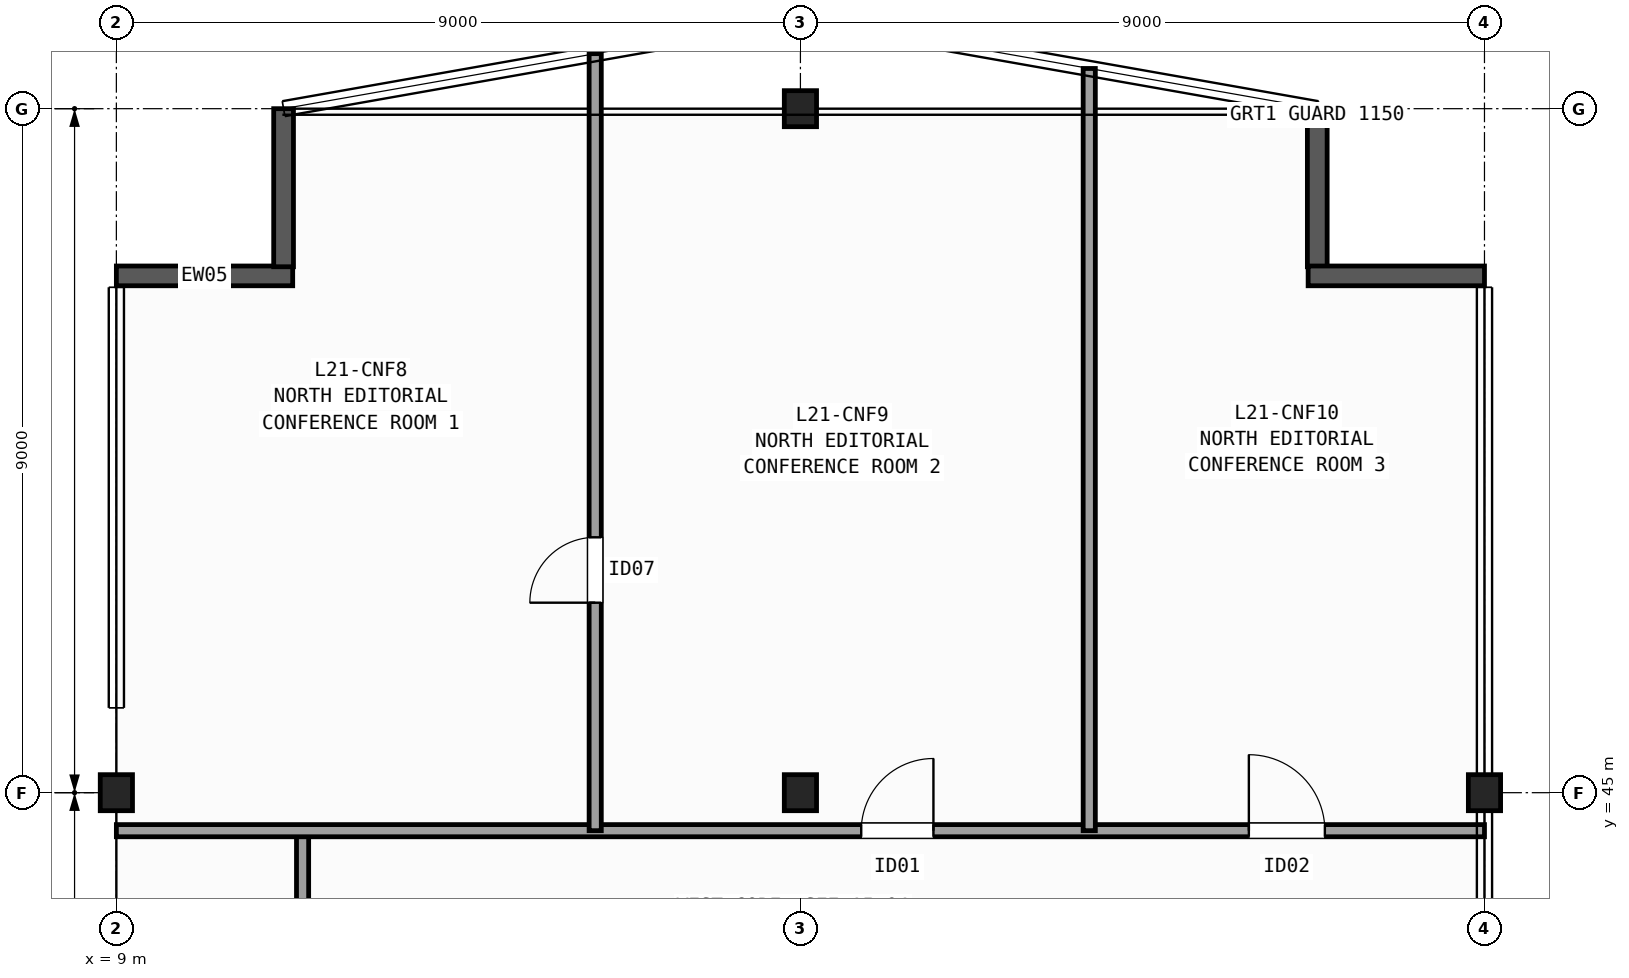
"""IFC4 building model, lengths in metres.
Left out: names, types, materials, properties, quantities, classifications, styles, units other than length and angle.
Written with IfcOpenShell. Run it as: python <this file> out.ifc"""

import sys

from ifc_helpers import new_model, si_unit, direction, frame, frame_2d, origin, origin_2d, place, context, subcontext, project, spatial, rectangle, i_section, extrude, element, fill, save


model = new_model("IFC4")
c1 = context("Model", 3, precision=1e-05, world=origin(), true_north=direction((0.0, 1.0)))
c2 = subcontext(c1, "Body", "Model", "MODEL_VIEW")
j1 = project(units=[si_unit("LENGTHUNIT", "METRE"), si_unit("PLANEANGLEUNIT", "RADIAN")], contexts=[c1])
p1 = place(None, origin())
s1 = spatial("IfcSite", under=j1, at=p1, CompositionType="ELEMENT")
p2 = place(p1, origin())
s2 = spatial("IfcBuilding", under=s1, at=p2, CompositionType="ELEMENT")
p3 = place(p2, frame((0.0, 0.0, 89.1)))
s3 = spatial("IfcBuildingStorey", under=s2, at=p3, CompositionType="ELEMENT", Elevation=89.1)
for number, where, z_axis, x_axis in (
    (1, (9.0, 45.0, 0.0), (0.0, 0.0, 1.0), (1.0, 0.0, 0.0)),
    (2, (18.0, 45.0, 0.0), (0.0, 0.0, 1.0), (1.0, 0.0, 0.0)),
    (3, (18.0, 54.0, 0.0), (0.0, 0.0, 1.0), (1.0, 0.0, 0.0)),
    (4, (27.0, 45.0, 0.0), (0.0, 0.0, 1.0), (1.0, 0.0, 0.0)),
):
    element("IfcColumn", number, at=place(p3, frame(where, z_axis=z_axis, x_axis=x_axis)), inside=s3, PredefinedType="COLUMN", context=c2, shape_type="SweptSolid", body=[
        extrude(i_section(OverallWidth=0.424, OverallDepth=0.474, WebThickness=0.048, FlangeThickness=0.077, FilletRadius=0.015, at=origin_2d()), origin(), (0.0, 0.0, 1.0), 3.7),
    ])
p4 = place(p3, frame((9.0, 51.8, 0.0), z_axis=(0.0, 0.0, 1.0), x_axis=(1.0, 0.0, 0.0)))
e5 = element("IfcWall", 5, at=p4, inside=s3, PredefinedType="SOLIDWALL", context=c2, shape_type="SweptSolid", body=[
    extrude(rectangle(XDim=2.32, YDim=0.26, at=frame_2d((1.16, 0.0))), origin(), (0.0, 0.0, 1.0), 3.42),
])
for number, where, z_axis, x_axis in (
    (6, (11.2, 51.92, 0.0), (0.0, 0.0, 1.0), (0.0, 1.0, 0.0)),
    (7, (24.8, 54.0, 0.0), (0.0, 0.0, 1.0), (0.0, -1.0, 0.0)),
):
    element("IfcWall", number, at=place(p3, frame(where, z_axis=z_axis, x_axis=x_axis)), inside=s3, PredefinedType="SOLIDWALL", context=c2, shape_type="SweptSolid", body=[
        extrude(rectangle(XDim=2.08, YDim=0.26, at=frame_2d((1.04, 0.0))), origin(), (0.0, 0.0, 1.0), 3.42),
    ])
p5 = place(p3, frame((24.68, 51.8, 0.0), z_axis=(0.0, 0.0, 1.0), x_axis=(1.0, 0.0, 0.0)))
e8 = element("IfcWall", 8, at=p5, inside=s3, PredefinedType="SOLIDWALL", context=c2, shape_type="SweptSolid", body=[
    extrude(rectangle(XDim=2.32, YDim=0.26, at=frame_2d((1.16, 0.0))), origin(), (0.0, 0.0, 1.0), 3.42),
])
p6 = place(p3, frame((11.45, 42.4, 0.0), z_axis=(0.0, 0.0, 1.0), x_axis=(0.0, 1.0, 0.0)))
e9 = element("IfcWall", 9, at=p6, inside=s3, PredefinedType="PARTITIONING", context=c2, shape_type="SweptSolid", body=[
    extrude(rectangle(XDim=2.1, YDim=0.16, at=frame_2d((1.05, 0.0))), origin(), (0.0, 0.0, 1.0), 3.42),
])
p7 = place(p3, frame((9.0, 44.5, 0.0), z_axis=(0.0, 0.0, 1.0), x_axis=(1.0, 0.0, 0.0)))
e10 = element("IfcWall", 10, at=p7, inside=s3, PredefinedType="PARTITIONING", context=c2, shape_type="SweptSolid", body=[
    extrude(rectangle(XDim=18.0, YDim=0.16, at=frame_2d((9.0, 0.0))), origin(), (0.0, 0.0, 1.0), 2.627),
])
p8 = place(p7, frame((9.8, 0.0, 0.0)))
e11 = element("IfcOpeningElement", 11, at=p8, cuts=e10, PredefinedType="OPENING", context=c2, shape_type="SweptSolid", body=[
    extrude(rectangle(XDim=0.95, YDim=2.1, at=frame_2d((0.475, 1.05))), frame((0.0, 0.09, 0.0), z_axis=(0.0, -1.0, 0.0), x_axis=(1.0, 0.0, 0.0)), (0.0, 0.0, 1.0), 0.18),
])
p9 = place(p7, frame((14.9, 0.0, 0.0)))
e12 = element("IfcOpeningElement", 12, at=p9, cuts=e10, PredefinedType="OPENING", context=c2, shape_type="SweptSolid", body=[
    extrude(rectangle(XDim=1.0, YDim=2.1, at=frame_2d((0.5, 1.05))), frame((0.0, 0.09, 0.0), z_axis=(0.0, -1.0, 0.0), x_axis=(1.0, 0.0, 0.0)), (0.0, 0.0, 1.0), 0.18),
])
p10 = place(p3, frame((15.3, 44.5, 0.0), z_axis=(0.0, 0.0, 1.0), x_axis=(0.0, 1.0, 0.0)))
e13 = element("IfcWall", 13, at=p10, inside=s3, PredefinedType="PARTITIONING", context=c2, shape_type="SweptSolid", body=[
    extrude(rectangle(XDim=10.224, YDim=0.16, at=frame_2d((5.112, 0.0))), origin(), (0.0, 0.0, 1.0), 3.42),
])
p11 = place(p10, frame((3.0, 0.0, 0.0)))
e14 = element("IfcOpeningElement", 14, at=p11, cuts=e13, PredefinedType="OPENING", context=c2, shape_type="SweptSolid", body=[
    extrude(rectangle(XDim=0.86, YDim=2.05, at=frame_2d((0.43, 1.025))), frame((0.0, 0.09, 0.0), z_axis=(0.0, -1.0, 0.0), x_axis=(1.0, 0.0, 0.0)), (0.0, 0.0, 1.0), 0.18),
])
p12 = place(p3, frame((21.8, 44.5, 0.0), z_axis=(0.0, 0.0, 1.0), x_axis=(0.0, 1.0, 0.0)))
e15 = element("IfcWall", 15, at=p12, inside=s3, PredefinedType="PARTITIONING", context=c2, shape_type="SweptSolid", body=[
    extrude(rectangle(XDim=10.029, YDim=0.16, at=frame_2d((5.015, 0.0))), origin(), (0.0, 0.0, 1.0), 3.42),
])
p13 = place(p11, origin())
e16 = element("IfcDoor", 16, at=p13, inside=s3, OperationType="SINGLE_SWING_LEFT", PredefinedType="DOOR", context=c2, shape_type="SweptSolid", body=[
    extrude(rectangle(XDim=0.86, YDim=2.05, at=frame_2d((0.43, 1.025))), frame((0.0, 0.025, 0.0), z_axis=(0.0, -1.0, 0.0), x_axis=(1.0, 0.0, 0.0)), (0.0, 0.0, 1.0), 0.05),
])
fill(e14, e16)
p14 = place(p8, origin())
e17 = element("IfcDoor", 17, at=p14, inside=s3, OperationType="SINGLE_SWING_RIGHT", PredefinedType="DOOR", context=c2, shape_type="SweptSolid", body=[
    extrude(rectangle(XDim=0.95, YDim=2.1, at=frame_2d((0.475, 1.05))), frame((0.0, 0.025, 0.0), z_axis=(0.0, -1.0, 0.0), x_axis=(1.0, 0.0, 0.0)), (0.0, 0.0, 1.0), 0.05),
])
fill(e11, e17)
p15 = place(p9, origin())
e18 = element("IfcDoor", 18, at=p15, inside=s3, OperationType="SINGLE_SWING_LEFT", PredefinedType="DOOR", context=c2, shape_type="SweptSolid", body=[
    extrude(rectangle(XDim=1.0, YDim=2.1, at=frame_2d((0.5, 1.05))), frame((0.0, 0.025, 0.0), z_axis=(0.0, -1.0, 0.0), x_axis=(1.0, 0.0, 0.0)), (0.0, 0.0, 1.0), 0.05),
])
fill(e12, e18)
save(model, sys.argv[1])
